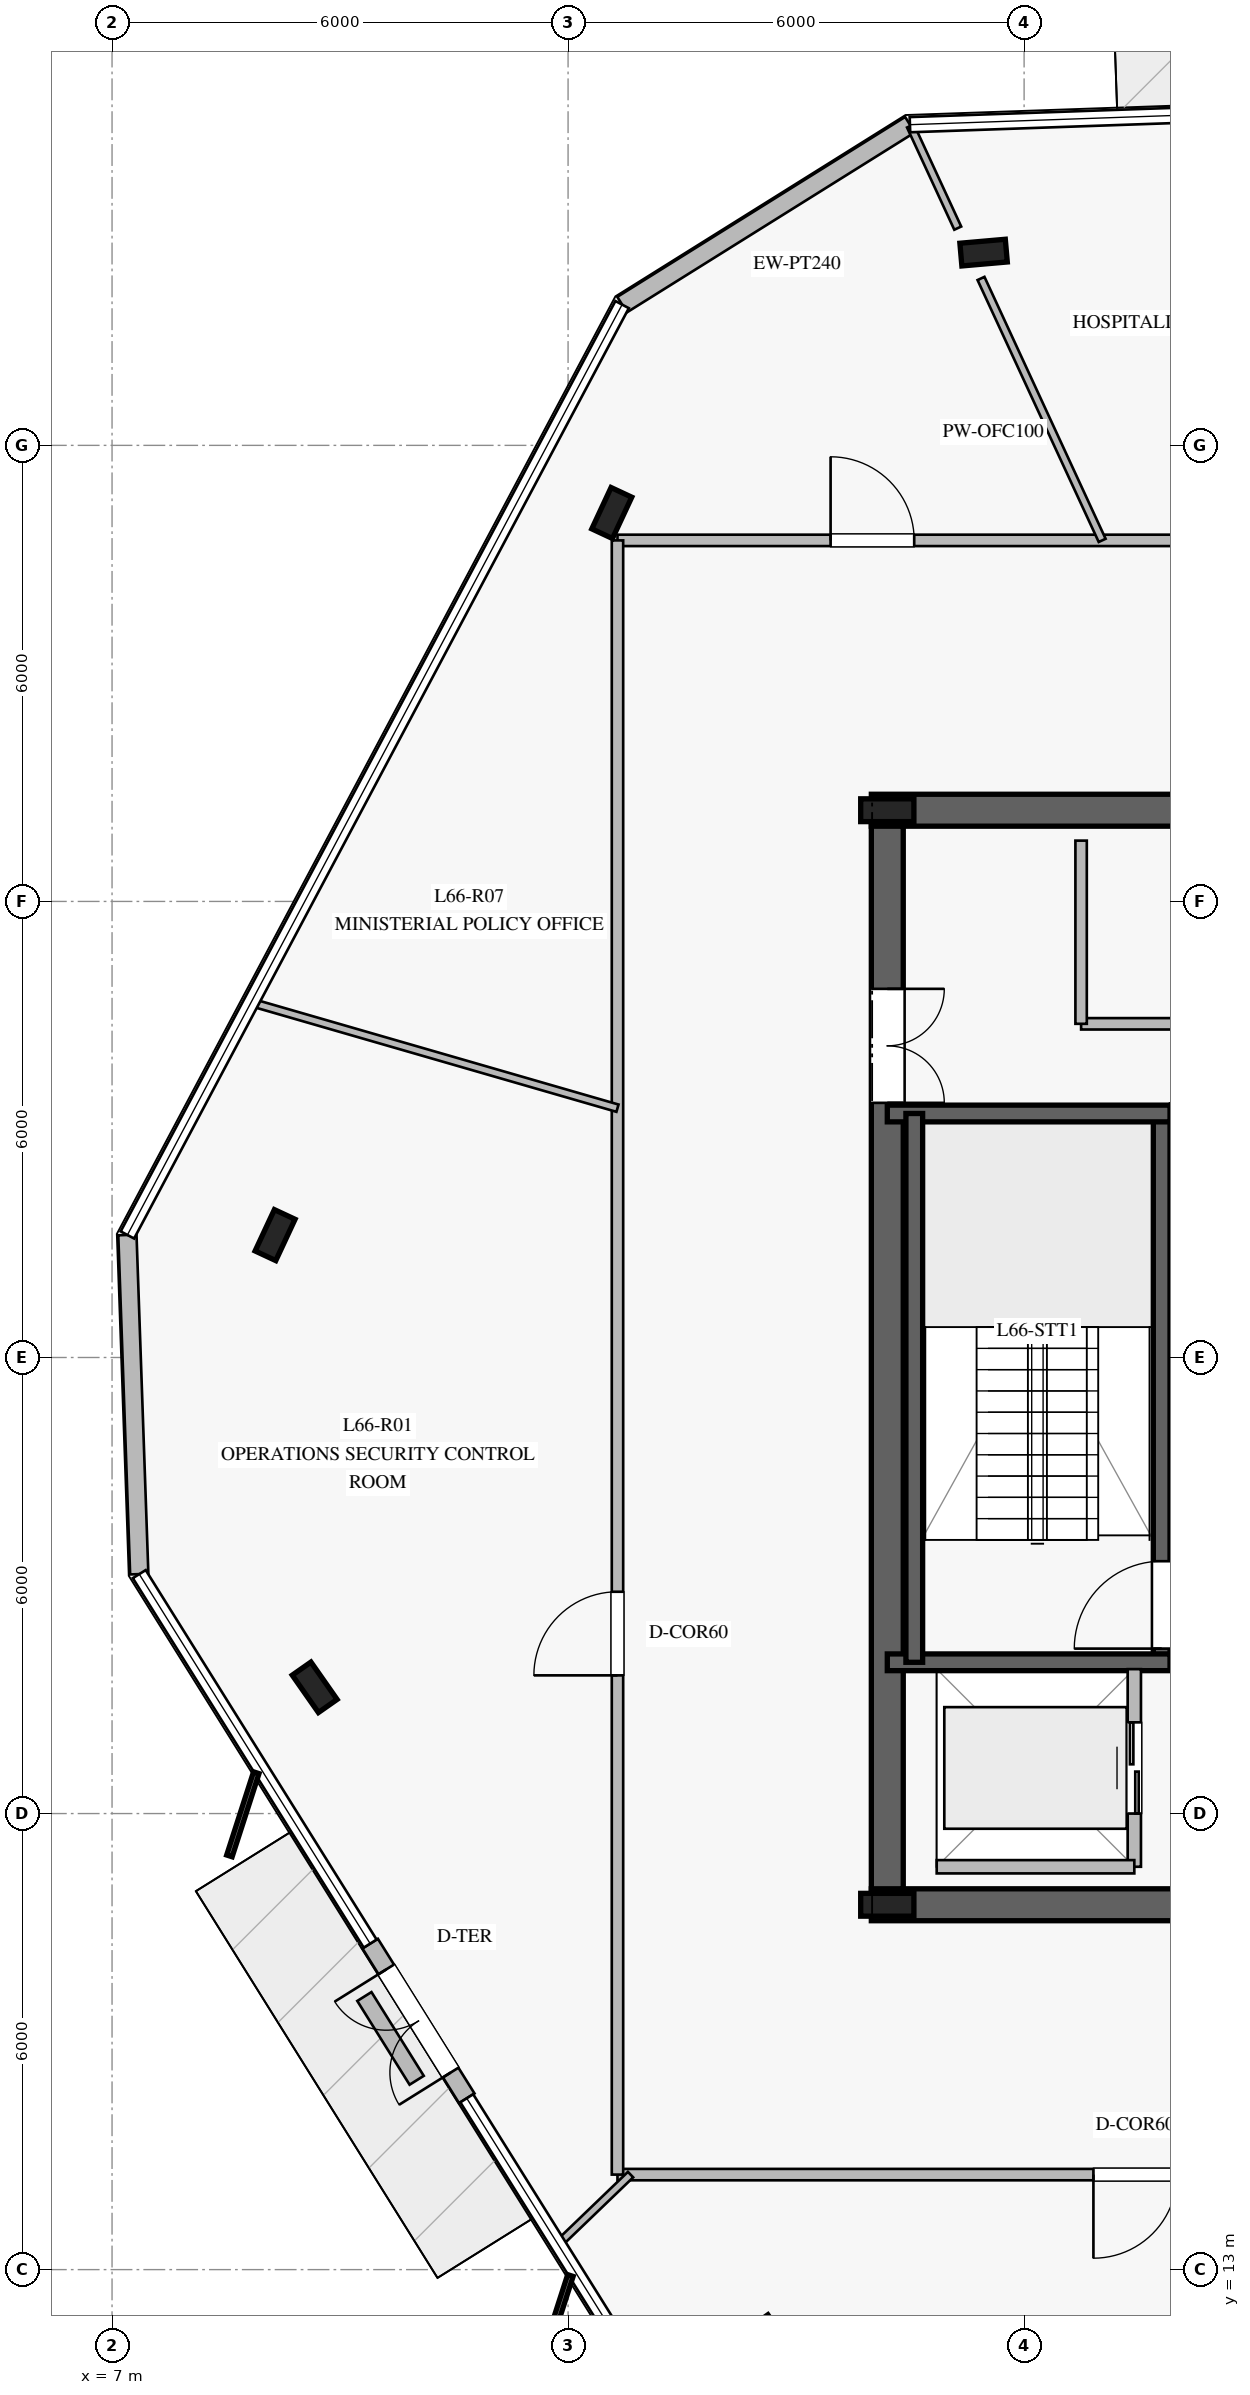
"""IFC4 building model, lengths in metres.
Left out: names, types, materials, properties, quantities, classifications, styles, units other than length and angle.
Written with IfcOpenShell. Run it as: python <this file> out.ifc"""

import sys

from ifc_helpers import new_model, si_unit, direction, frame, frame_2d, origin, origin_2d, place, context, subcontext, project, spatial, rectangle, i_section, extrude, element, fill, save


model = new_model("IFC4")
c1 = context("Model", 3, precision=1e-05, world=origin(), true_north=direction((0.0, 1.0)))
c2 = subcontext(c1, "Body", "Model", "MODEL_VIEW")
j1 = project(units=[si_unit("LENGTHUNIT", "METRE"), si_unit("PLANEANGLEUNIT", "RADIAN")], contexts=[c1])
p1 = place(None, origin())
s1 = spatial("IfcSite", under=j1, at=p1, CompositionType="ELEMENT")
p2 = place(p1, origin())
s2 = spatial("IfcBuilding", under=s1, at=p2, CompositionType="ELEMENT")
p3 = place(p2, frame((0.0, 0.0, 274.2)))
s3 = spatial("IfcBuildingStorey", under=s2, at=p3, CompositionType="ELEMENT", Elevation=274.2)
p4 = place(p3, frame((16.99, 17.8, 0.0), z_axis=(0.0, 0.0, 1.0), x_axis=(1.0, 0.0, 0.0)))
e1 = element("IfcWall", 1, at=p4, inside=s3, PredefinedType="SHEAR", context=c2, shape_type="SweptSolid", body=[
    extrude(rectangle(XDim=16.02, YDim=0.42, at=frame_2d((8.01, 0.0))), origin(), (0.0, 0.0, 1.0), 3.78),
])
p5 = place(p4, frame((4.96, 0.0, 0.0)))
e2 = element("IfcOpeningElement", 2, at=p5, cuts=e1, PredefinedType="OPENING", context=c2, shape_type="SweptSolid", body=[
    extrude(rectangle(XDim=1.2, YDim=2.25, at=frame_2d((0.6, 1.125))), frame((0.0, 0.22, 0.0), z_axis=(0.0, -1.0, 0.0), x_axis=(1.0, 0.0, 0.0)), (0.0, 0.0, 1.0), 0.44),
])
p6 = place(p4, frame((13.91, 0.0, 0.0)))
e3 = element("IfcOpeningElement", 3, at=p6, cuts=e1, PredefinedType="OPENING", context=c2, shape_type="SweptSolid", body=[
    extrude(rectangle(XDim=0.9, YDim=2.1, at=frame_2d((0.45, 1.05))), frame((0.0, 0.22, 0.0), z_axis=(0.0, -1.0, 0.0), x_axis=(1.0, 0.0, 0.0)), (0.0, 0.0, 1.0), 0.44),
])
p7 = place(p4, frame((9.16, 0.0, 0.0)))
e4 = element("IfcOpeningElement", 4, at=p7, cuts=e1, PredefinedType="OPENING", context=c2, shape_type="SweptSolid", body=[
    extrude(rectangle(XDim=1.1, YDim=2.2, at=frame_2d((0.55, 1.1))), frame((0.0, 0.22, 0.0), z_axis=(0.0, -1.0, 0.0), x_axis=(1.0, 0.0, 0.0)), (0.0, 0.0, 1.0), 0.44),
])
p8 = place(p3, frame((33.01, 32.2, 0.0), z_axis=(0.0, 0.0, 1.0), x_axis=(-1.0, 0.0, 0.0)))
e5 = element("IfcWall", 5, at=p8, inside=s3, PredefinedType="SHEAR", context=c2, shape_type="SweptSolid", body=[
    extrude(rectangle(XDim=16.02, YDim=0.42, at=frame_2d((8.01, 0.0))), origin(), (0.0, 0.0, 1.0), 3.78),
])
p9 = place(p8, frame((4.96, 0.0, 0.0)))
e6 = element("IfcOpeningElement", 6, at=p9, cuts=e5, PredefinedType="OPENING", context=c2, shape_type="SweptSolid", body=[
    extrude(rectangle(XDim=1.2, YDim=2.25, at=frame_2d((0.6, 1.125))), frame((0.0, 0.22, 0.0), z_axis=(0.0, -1.0, 0.0), x_axis=(1.0, 0.0, 0.0)), (0.0, 0.0, 1.0), 0.44),
])
p10 = place(p8, frame((9.785, 0.0, 0.0)))
e7 = element("IfcOpeningElement", 7, at=p10, cuts=e5, PredefinedType="OPENING", context=c2, shape_type="SweptSolid", body=[
    extrude(rectangle(XDim=1.1, YDim=2.2, at=frame_2d((0.55, 1.1))), frame((0.0, 0.22, 0.0), z_axis=(0.0, -1.0, 0.0), x_axis=(1.0, 0.0, 0.0)), (0.0, 0.0, 1.0), 0.44),
])
p11 = place(p3, frame((17.2, 31.99, 0.0), z_axis=(0.0, 0.0, 1.0), x_axis=(0.0, -1.0, 0.0)))
e8 = element("IfcWall", 8, at=p11, inside=s3, PredefinedType="SHEAR", context=c2, shape_type="SweptSolid", body=[
    extrude(rectangle(XDim=13.98, YDim=0.42, at=frame_2d((6.99, 0.0))), origin(), (0.0, 0.0, 1.0), 3.78),
])
p12 = place(p11, frame((2.14, 0.0, 0.0)))
e9 = element("IfcOpeningElement", 9, at=p12, cuts=e8, PredefinedType="OPENING", context=c2, shape_type="SweptSolid", body=[
    extrude(rectangle(XDim=1.5, YDim=2.2, at=frame_2d((0.75, 1.1))), frame((0.0, 0.22, 0.0), z_axis=(0.0, -1.0, 0.0), x_axis=(1.0, 0.0, 0.0)), (0.0, 0.0, 1.0), 0.44),
])
for number, where, z_axis, x_axis in (
    (10, (17.2, 17.8, 0.0), (0.0, 0.0, 1.0), (1.0, 0.0, 0.0)),
    (11, (17.2, 32.2, 0.0), (0.0, 0.0, 1.0), (1.0, 0.0, 0.0)),
):
    element("IfcColumn", number, at=place(p3, frame(where, z_axis=z_axis, x_axis=x_axis)), inside=s3, PredefinedType="COLUMN", context=c2, shape_type="SweptSolid", body=[
        extrude(i_section(OverallWidth=0.3, OverallDepth=0.7, WebThickness=0.017, FlangeThickness=0.032, at=origin_2d()), origin(), (0.0, 0.0, 1.0), 4.0),
    ])
p13 = place(p3, frame((20.81, 20.99, 0.0), z_axis=(0.0, 0.0, 1.0), x_axis=(0.0, 1.0, 0.0)))
e12 = element("IfcWall", 12, at=p13, inside=s3, PredefinedType="SOLIDWALL", context=c2, shape_type="SweptSolid", body=[
    extrude(rectangle(XDim=7.22, YDim=0.22, at=frame_2d((3.61, 0.0))), origin(), (0.0, 0.0, 1.0), 3.78),
])
p14 = place(p13, frame((0.18, 0.0, 0.0)))
e13 = element("IfcOpeningElement", 13, at=p14, cuts=e12, PredefinedType="OPENING", context=c2, shape_type="SweptSolid", body=[
    extrude(rectangle(XDim=1.15, YDim=2.2, at=frame_2d((0.575, 1.1))), frame((0.0, 0.12, 0.0), z_axis=(0.0, -1.0, 0.0), x_axis=(1.0, 0.0, 0.0)), (0.0, 0.0, 1.0), 0.24),
])
for number, where, z_axis, x_axis in (
    (14, (17.2, 20.99, 0.0), (0.0, 0.0, 1.0), (1.0, 0.0, 0.0)),
    (15, (17.2, 28.21, 0.0), (0.0, 0.0, 1.0), (1.0, 0.0, 0.0)),
):
    element("IfcWall", number, at=place(p3, frame(where, z_axis=z_axis, x_axis=x_axis)), inside=s3, PredefinedType="SOLIDWALL", context=c2, shape_type="SweptSolid", body=[
        extrude(rectangle(XDim=3.72, YDim=0.22, at=frame_2d((1.86, 0.0))), origin(), (0.0, 0.0, 1.0), 3.78),
    ])
p15 = place(p3, frame((17.555, 28.21, 0.0), z_axis=(0.0, 0.0, 1.0), x_axis=(0.0, -1.0, 0.0)))
e16 = element("IfcWall", 16, at=p15, inside=s3, PredefinedType="SOLIDWALL", context=c2, shape_type="SweptSolid", body=[
    extrude(rectangle(XDim=7.22, YDim=0.22, at=frame_2d((3.61, 0.0))), origin(), (0.0, 0.0, 1.0), 3.78),
])
for number, where, z_axis, x_axis in (
    (17, (18.467, 39.536, 0.0), (0.0, 0.0, 1.0), (0.996, 0.087, 0.0)),
    (18, (13.575, 36.11, 0.0), (0.0, 0.0, 1.0), (0.423, 0.906, 0.0)),
    (19, (9.145, 26.61, 0.0), (0.0, 0.0, 1.0), (0.423, 0.906, 0.0)),
    (20, (9.666, 20.661, 0.0), (0.0, 0.0, 1.0), (-0.574, 0.819, 0.0)),
):
    element("IfcColumn", number, at=place(p3, frame(where, z_axis=z_axis, x_axis=x_axis)), inside=s3, PredefinedType="COLUMN", context=c2, shape_type="SweptSolid", body=[
        extrude(i_section(OverallWidth=0.3, OverallDepth=0.6, WebThickness=0.015, FlangeThickness=0.03, at=origin_2d()), origin(), (0.0, 0.0, 1.0), 4.0),
    ])
p16 = place(p3, frame((17.498, 41.219, 0.0), z_axis=(0.0, 0.0, 1.0), x_axis=(-0.847998304005, -0.529998940003, 0.0)))
e21 = element("IfcWall", 21, at=p16, inside=s3, PredefinedType="STANDARD", context=c2, shape_type="SweptSolid", body=[
    extrude(rectangle(XDim=4.466, YDim=0.24, at=frame_2d((2.233, 0.0))), origin(), (0.0, 0.0, 1.0), 3.78),
])
p17 = place(p3, frame((7.202, 26.612, 0.0), z_axis=(0.0, 0.0, 1.0), x_axis=(0.034940625932, -0.999389389907, 0.0)))
e22 = element("IfcWall", 22, at=p17, inside=s3, PredefinedType="STANDARD", context=c2, shape_type="SweptSolid", body=[
    extrude(rectangle(XDim=4.465, YDim=0.24, at=frame_2d((2.232, 0.0))), origin(), (0.0, 0.0, 1.0), 3.78),
])
p18 = place(p3, frame((10.396, 17.289, 0.0), z_axis=(0.0, 0.0, 1.0), x_axis=(0.529706236636, -0.848181173376, 0.0)))
e23 = element("IfcWall", 23, at=p18, inside=s3, PredefinedType="STANDARD", context=c2, shape_type="SweptSolid", body=[
    extrude(rectangle(XDim=2.399, YDim=0.24, at=frame_2d((1.2, 0.0))), origin(), (0.0, 0.0, 1.0), 3.78),
])
p19 = place(p18, frame((0.4, 0.0, 0.0)))
e24 = element("IfcOpeningElement", 24, at=p19, cuts=e23, PredefinedType="OPENING", context=c2, shape_type="SweptSolid", body=[
    extrude(rectangle(XDim=1.6, YDim=2.25, at=frame_2d((0.8, 1.125))), frame((0.0, 0.13, 0.0), z_axis=(0.0, -1.0, 0.0), x_axis=(1.0, 0.0, 0.0)), (0.0, 0.0, 1.0), 0.26),
])
p20 = place(p3, frame((10.32, 16.593, 0.0), z_axis=(0.0, 0.0, 1.0), x_axis=(0.52955968417, -0.848272680747, 0.0)))
e25 = element("IfcWall", 25, at=p20, inside=s3, PredefinedType="USERDEFINED", context=c2, shape_type="SweptSolid", body=[
    extrude(rectangle(XDim=1.299, YDim=0.22, at=frame_2d((0.649, 0.0))), origin(), (0.0, 0.0, 1.0), 0.4),
])
p21 = place(p3, frame((20.92, 23.35, 0.0), z_axis=(0.0, 0.0, 1.0), x_axis=(1.0, 0.0, 0.0)))
e26 = element("IfcWall", 26, at=p21, inside=s3, PredefinedType="PARTITIONING", context=c2, shape_type="SweptSolid", body=[
    extrude(rectangle(XDim=3.38, YDim=0.2, at=frame_2d((1.69, 0.0))), origin(), (0.0, 0.0, 1.0), 3.78),
])
p22 = place(p3, frame((20.92, 28.28, 0.0), z_axis=(0.0, 0.0, 1.0), x_axis=(1.0, 0.0, 0.0)))
e27 = element("IfcWall", 27, at=p22, inside=s3, PredefinedType="PARTITIONING", context=c2, shape_type="SweptSolid", body=[
    extrude(rectangle(XDim=3.405, YDim=0.125, at=frame_2d((1.703, 0.0))), origin(), (0.0, 0.0, 1.0), 3.78),
])
p23 = place(p3, frame((19.75, 29.39, 0.0), z_axis=(0.0, 0.0, 1.0), x_axis=(1.0, 0.0, 0.0)))
e28 = element("IfcWall", 28, at=p23, inside=s3, PredefinedType="PARTITIONING", context=c2, shape_type="SweptSolid", body=[
    extrude(rectangle(XDim=5.9, YDim=0.15, at=frame_2d((2.95, 0.0))), origin(), (0.0, 0.0, 1.0), 3.78),
])
p24 = place(p3, frame((19.75, 29.39, 0.0), z_axis=(0.0, 0.0, 1.0), x_axis=(0.0, 1.0, 0.0)))
e29 = element("IfcWall", 29, at=p24, inside=s3, PredefinedType="PARTITIONING", context=c2, shape_type="SweptSolid", body=[
    extrude(rectangle(XDim=2.41, YDim=0.15, at=frame_2d((1.205, 0.0))), origin(), (0.0, 0.0, 1.0), 3.78),
])
p25 = place(p3, frame((20.45, 18.3, 0.0), z_axis=(0.0, 0.0, 1.0), x_axis=(0.0, 1.0, 0.0)))
e30 = element("IfcWall", 30, at=p25, inside=s3, PredefinedType="PARTITIONING", context=c2, shape_type="SweptSolid", body=[
    extrude(rectangle(XDim=2.6, YDim=0.175, at=frame_2d((1.3, 0.0))), origin(), (0.0, 0.0, 1.0), 3.78),
])
p26 = place(p25, frame((0.7, 0.0, 0.0)))
e31 = element("IfcOpeningElement", 31, at=p26, cuts=e30, PredefinedType="OPENING", context=c2, shape_type="SweptSolid", body=[
    extrude(rectangle(XDim=1.2, YDim=2.2, at=frame_2d((0.6, 1.1))), frame((0.0, 0.098, 0.0), z_axis=(0.0, -1.0, 0.0), x_axis=(1.0, 0.0, 0.0)), (0.0, 0.0, 1.0), 0.195),
])
p27 = place(p3, frame((17.85, 18.3, 0.0), z_axis=(0.0, 0.0, 1.0), x_axis=(1.0, 0.0, 0.0)))
e32 = element("IfcWall", 32, at=p27, inside=s3, PredefinedType="PARTITIONING", context=c2, shape_type="SweptSolid", body=[
    extrude(rectangle(XDim=2.6, YDim=0.175, at=frame_2d((1.3, 0.0))), origin(), (0.0, 0.0, 1.0), 3.78),
])
p28 = place(p3, frame((13.65, 35.75, 0.0), z_axis=(0.0, 0.0, 1.0), x_axis=(1.0, 0.0, 0.0)))
e33 = element("IfcWall", 33, at=p28, inside=s3, PredefinedType="PARTITIONING", context=c2, shape_type="SweptSolid", body=[
    extrude(rectangle(XDim=22.7, YDim=0.15, at=frame_2d((11.35, 0.0))), origin(), (0.0, 0.0, 1.0), 3.05),
])
p29 = place(p28, frame((9.5, 0.0, 0.0)))
e34 = element("IfcOpeningElement", 34, at=p29, cuts=e33, PredefinedType="OPENING", context=c2, shape_type="SweptSolid", body=[
    extrude(rectangle(XDim=1.1, YDim=2.2, at=frame_2d((0.55, 1.1))), frame((0.0, 0.085, 0.0), z_axis=(0.0, -1.0, 0.0), x_axis=(1.0, 0.0, 0.0)), (0.0, 0.0, 1.0), 0.17),
])
p30 = place(p28, frame((17.494, 0.0, 0.0)))
e35 = element("IfcOpeningElement", 35, at=p30, cuts=e33, PredefinedType="OPENING", context=c2, shape_type="SweptSolid", body=[
    extrude(rectangle(XDim=1.1, YDim=2.2, at=frame_2d((0.55, 1.1))), frame((0.0, 0.085, 0.0), z_axis=(0.0, -1.0, 0.0), x_axis=(1.0, 0.0, 0.0)), (0.0, 0.0, 1.0), 0.17),
])
p31 = place(p28, frame((2.804, 0.0, 0.0)))
e36 = element("IfcOpeningElement", 36, at=p31, cuts=e33, PredefinedType="OPENING", context=c2, shape_type="SweptSolid", body=[
    extrude(rectangle(XDim=1.1, YDim=2.2, at=frame_2d((0.55, 1.1))), frame((0.0, 0.085, 0.0), z_axis=(0.0, -1.0, 0.0), x_axis=(1.0, 0.0, 0.0)), (0.0, 0.0, 1.0), 0.17),
])
p32 = place(p3, frame((36.35, 14.25, 0.0), z_axis=(0.0, 0.0, 1.0), x_axis=(-1.0, 0.0, 0.0)))
e37 = element("IfcWall", 37, at=p32, inside=s3, PredefinedType="PARTITIONING", context=c2, shape_type="SweptSolid", body=[
    extrude(rectangle(XDim=22.7, YDim=0.15, at=frame_2d((11.35, 0.0))), origin(), (0.0, 0.0, 1.0), 3.05),
])
p33 = place(p32, frame((15.338, 0.0, 0.0)))
e38 = element("IfcOpeningElement", 38, at=p33, cuts=e37, PredefinedType="OPENING", context=c2, shape_type="SweptSolid", body=[
    extrude(rectangle(XDim=1.1, YDim=2.2, at=frame_2d((0.55, 1.1))), frame((0.0, 0.085, 0.0), z_axis=(0.0, -1.0, 0.0), x_axis=(1.0, 0.0, 0.0)), (0.0, 0.0, 1.0), 0.17),
])
p34 = place(p3, frame((13.65, 14.25, 0.0), z_axis=(0.0, 0.0, 1.0), x_axis=(0.0, 1.0, 0.0)))
e39 = element("IfcWall", 39, at=p34, inside=s3, PredefinedType="PARTITIONING", context=c2, shape_type="SweptSolid", body=[
    extrude(rectangle(XDim=21.5, YDim=0.15, at=frame_2d((10.75, 0.0))), origin(), (0.0, 0.0, 1.0), 3.28),
])
p35 = place(p34, frame((6.568, 0.0, 0.0)))
e40 = element("IfcOpeningElement", 40, at=p35, cuts=e39, PredefinedType="OPENING", context=c2, shape_type="SweptSolid", body=[
    extrude(rectangle(XDim=1.1, YDim=2.2, at=frame_2d((0.55, 1.1))), frame((0.0, 0.085, 0.0), z_axis=(0.0, -1.0, 0.0), x_axis=(1.0, 0.0, 0.0)), (0.0, 0.0, 1.0), 0.17),
])
p36 = place(p3, frame((20.027, 35.75, 0.0), z_axis=(0.0, 0.0, 1.0), x_axis=(-0.419820544202, 0.907607134539, 0.0)))
e41 = element("IfcWall", 41, at=p36, inside=s3, PredefinedType="MOVABLE", context=c2, shape_type="SweptSolid", body=[
    extrude(rectangle(XDim=3.797, YDim=0.1, at=frame_2d((1.898, 0.0))), origin(), (0.0, 0.0, 1.0), 3.28),
])
p37 = place(p3, frame((18.127, 39.858, 0.0), z_axis=(0.0, 0.0, 1.0), x_axis=(-0.419789381907, 0.907621548245, 0.0)))
e42 = element("IfcWall", 42, at=p37, inside=s3, PredefinedType="MOVABLE", context=c2, shape_type="SweptSolid", body=[
    extrude(rectangle(XDim=1.482, YDim=0.1, at=frame_2d((0.741, 0.0))), origin(), (0.0, 0.0, 1.0), 3.78),
])
p38 = place(p3, frame((13.65, 28.28, 0.0), z_axis=(0.0, 0.0, 1.0), x_axis=(-0.960722281135, 0.277511618731, 0.0)))
e43 = element("IfcWall", 43, at=p38, inside=s3, PredefinedType="MOVABLE", context=c2, shape_type="SweptSolid", body=[
    extrude(rectangle(XDim=5.001, YDim=0.1, at=frame_2d((2.501, 0.0))), origin(), (0.0, 0.0, 1.0), 3.28),
])
p39 = place(p3, frame((13.822, 14.25, 0.0), z_axis=(0.0, 0.0, 1.0), x_axis=(-0.720793582425, -0.693149775687, 0.0)))
e44 = element("IfcWall", 44, at=p39, inside=s3, PredefinedType="MOVABLE", context=c2, shape_type="SweptSolid", body=[
    extrude(rectangle(XDim=1.307, YDim=0.1, at=frame_2d((0.654, 0.0))), origin(), (0.0, 0.0, 1.0), 3.28),
])
p40 = place(p19, frame((1.6, 0.0, 0.0), z_axis=(0.0, 0.0, 1.0), x_axis=(-1.0, 0.0, 0.0)))
e45 = element("IfcDoor", 45, at=p40, inside=s3, OperationType="DOUBLE_DOOR_SINGLE_SWING", PredefinedType="DOOR", context=c2, shape_type="SweptSolid", body=[
    extrude(rectangle(XDim=1.6, YDim=2.25, at=frame_2d((0.8, 1.125))), frame((0.0, 0.025, 0.0), z_axis=(0.0, -1.0, 0.0), x_axis=(1.0, 0.0, 0.0)), (0.0, 0.0, 1.0), 0.05),
])
fill(e24, e45)
p41 = place(p14, origin())
e46 = element("IfcDoor", 46, at=p41, inside=s3, OperationType="SINGLE_SWING_LEFT", PredefinedType="DOOR", context=c2, shape_type="SweptSolid", body=[
    extrude(rectangle(XDim=1.15, YDim=2.2, at=frame_2d((0.575, 1.1))), frame((0.0, 0.025, 0.0), z_axis=(0.0, -1.0, 0.0), x_axis=(1.0, 0.0, 0.0)), (0.0, 0.0, 1.0), 0.05),
])
fill(e13, e46)
p42 = place(p12, origin())
e47 = element("IfcDoor", 47, at=p42, inside=s3, OperationType="DOUBLE_DOOR_SINGLE_SWING", PredefinedType="DOOR", context=c2, shape_type="SweptSolid", body=[
    extrude(rectangle(XDim=1.5, YDim=2.2, at=frame_2d((0.75, 1.1))), frame((0.0, 0.025, 0.0), z_axis=(0.0, -1.0, 0.0), x_axis=(1.0, 0.0, 0.0)), (0.0, 0.0, 1.0), 0.05),
])
fill(e9, e47)
p43 = place(p26, origin())
e48 = element("IfcDoor", 48, at=p43, inside=s3, OperationType="DOUBLE_DOOR_SLIDING", PredefinedType="DOOR", context=c2, shape_type="SweptSolid", body=[
    extrude(rectangle(XDim=1.2, YDim=2.2, at=frame_2d((0.6, 1.1))), frame((0.0, 0.025, 0.0), z_axis=(0.0, -1.0, 0.0), x_axis=(1.0, 0.0, 0.0)), (0.0, 0.0, 1.0), 0.05),
])
fill(e31, e48)
p44 = place(p35, origin())
e49 = element("IfcDoor", 49, at=p44, inside=s3, OperationType="SINGLE_SWING_LEFT", PredefinedType="DOOR", context=c2, shape_type="SweptSolid", body=[
    extrude(rectangle(XDim=1.1, YDim=2.2, at=frame_2d((0.55, 1.1))), frame((0.0, 0.025, 0.0), z_axis=(0.0, -1.0, 0.0), x_axis=(1.0, 0.0, 0.0)), (0.0, 0.0, 1.0), 0.05),
])
fill(e40, e49)
p45 = place(p33, origin())
e50 = element("IfcDoor", 50, at=p45, inside=s3, OperationType="SINGLE_SWING_RIGHT", PredefinedType="DOOR", context=c2, shape_type="SweptSolid", body=[
    extrude(rectangle(XDim=1.1, YDim=2.2, at=frame_2d((0.55, 1.1))), frame((0.0, 0.025, 0.0), z_axis=(0.0, -1.0, 0.0), x_axis=(1.0, 0.0, 0.0)), (0.0, 0.0, 1.0), 0.05),
])
fill(e38, e50)
p46 = place(p31, origin())
e51 = element("IfcDoor", 51, at=p46, inside=s3, OperationType="SINGLE_SWING_LEFT", PredefinedType="DOOR", context=c2, shape_type="SweptSolid", body=[
    extrude(rectangle(XDim=1.1, YDim=2.2, at=frame_2d((0.55, 1.1))), frame((0.0, 0.025, 0.0), z_axis=(0.0, -1.0, 0.0), x_axis=(1.0, 0.0, 0.0)), (0.0, 0.0, 1.0), 0.05),
])
fill(e36, e51)
save(model, sys.argv[1])
